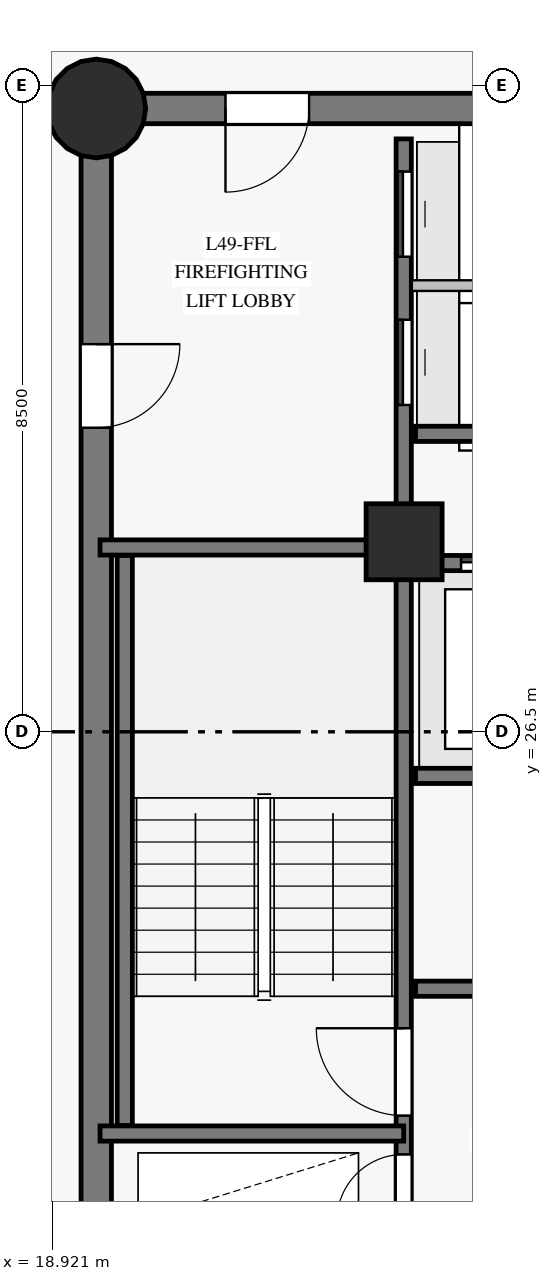
"""IFC4 building model, lengths in metres.
Left out: names, types, materials, properties, quantities, classifications, styles, units other than length and angle.
Written with IfcOpenShell. Run it as: python <this file> out.ifc"""

import sys

from ifc_helpers import new_model, si_unit, direction, frame, frame_2d, origin, origin_with_axes, origin_2d, place, context, subcontext, project, spatial, rectangle, circle, extrude, source, transform, mapped, element, fill, save


model = new_model("IFC4")
c1 = context("Model", 3, precision=1e-05, world=origin(), true_north=direction((0.0, 1.0)))
c2 = subcontext(c1, "Body", "Model", "MODEL_VIEW")
j1 = project(units=[si_unit("LENGTHUNIT", "METRE"), si_unit("PLANEANGLEUNIT", "RADIAN")], contexts=[c1])
p1 = place(None, origin())
s1 = spatial("IfcSite", under=j1, at=p1, CompositionType="ELEMENT")
p2 = place(p1, origin())
s2 = spatial("IfcBuilding", under=s1, at=p2, CompositionType="ELEMENT")
p3 = place(p2, frame((0.0, 0.0, 171.8)))
s3 = spatial("IfcBuildingStorey", under=s2, at=p3, CompositionType="ELEMENT", Elevation=171.8)
p4 = place(p3, frame((26.55, 34.7, 0.0), z_axis=(0.0, 0.0, 1.0), x_axis=(-1.0, 0.0, 0.0)))
e1 = element("IfcWall", 1, at=p4, inside=s3, PredefinedType="SHEAR", context=c2, shape_type="SweptSolid", body=[
    extrude(rectangle(XDim=7.05, YDim=0.4, at=frame_2d((3.525, 0.0))), origin(), (0.0, 0.0, 1.0), 2.825),
])
p5 = place(p4, frame((4.25, 0.0, 0.0)))
e2 = element("IfcOpeningElement", 2, at=p5, cuts=e1, PredefinedType="OPENING", context=c2, shape_type="SweptSolid", body=[
    extrude(rectangle(XDim=1.1, YDim=2.15, at=frame_2d((0.55, 1.075))), frame((0.0, 0.21, 0.0), z_axis=(0.0, -1.0, 0.0), x_axis=(1.0, 0.0, 0.0)), (0.0, 0.0, 1.0), 0.42),
])
p6 = place(p3, frame((19.5, 34.7, 0.0), z_axis=(0.0, 0.0, 1.0), x_axis=(0.0, -1.0, 0.0)))
e3 = element("IfcWall", 3, at=p6, inside=s3, PredefinedType="SHEAR", context=c2, shape_type="SweptSolid", body=[
    extrude(rectangle(XDim=16.4, YDim=0.4, at=frame_2d((8.2, 0.0))), origin(), (0.0, 0.0, 1.0), 2.825),
])
p7 = place(p6, frame((3.1, 0.0, 0.0)))
e4 = element("IfcOpeningElement", 4, at=p7, cuts=e3, PredefinedType="OPENING", context=c2, shape_type="SweptSolid", body=[
    extrude(rectangle(XDim=1.1, YDim=2.15, at=frame_2d((0.55, 1.075))), frame((0.0, 0.21, 0.0), z_axis=(0.0, -1.0, 0.0), x_axis=(1.0, 0.0, 0.0)), (0.0, 0.0, 1.0), 0.42),
])
m1 = source(origin_with_axes(), c2, "Body", "SweptSolid", [
    extrude(circle(Radius=0.65, at=origin_2d()), origin(), (0.0, 0.0, 1.0), 3.05),
])
p8 = place(p3, frame((19.5, 34.7, 0.0), z_axis=(0.0, 0.0, 1.0), x_axis=(1.0, 0.0, 0.0)))
e5 = element("IfcColumn", 5, at=p8, inside=s3, PredefinedType="COLUMN", context=c2, shape_type="MappedRepresentation", body=[
    mapped(m1, transform((0.0, 0.0, 0.0), scale=1.0)),
])
m2 = source(origin_with_axes(), c2, "Body", "SweptSolid", [
    extrude(rectangle(XDim=1.0, YDim=1.0, at=origin_2d()), origin(), (0.0, 0.0, 1.0), 3.05),
])
p9 = place(p3, frame((23.55, 29.0, 0.0), z_axis=(0.0, 0.0, 1.0), x_axis=(1.0, 0.0, 0.0)))
e6 = element("IfcColumn", 6, at=p9, inside=s3, PredefinedType="COLUMN", context=c2, shape_type="MappedRepresentation", body=[
    mapped(m2, transform((0.0, 0.0, 0.0), scale=1.0)),
])
p10 = place(p3, frame((23.545, 18.7, 0.0), z_axis=(0.0, 0.0, 1.0), x_axis=(0.0, 1.0, 0.0)))
e7 = element("IfcWall", 7, at=p10, inside=s3, PredefinedType="SHEAR", context=c2, shape_type="SweptSolid", body=[
    extrude(rectangle(XDim=15.6, YDim=0.2, at=frame_2d((7.8, 0.0))), origin(), (0.0, 0.0, 1.0), 2.825),
])
p11 = place(p10, frame((2.75, 0.0, 0.0)))
e8 = element("IfcOpeningElement", 8, at=p11, cuts=e7, PredefinedType="OPENING", context=c2, shape_type="SweptSolid", body=[
    extrude(rectangle(XDim=1.15, YDim=2.15, at=frame_2d((0.575, 1.075))), frame((0.0, 0.11, 0.0), z_axis=(0.0, -1.0, 0.0), x_axis=(1.0, 0.0, 0.0)), (0.0, 0.0, 1.0), 0.22),
])
p12 = place(p10, frame((0.14, 0.0, 0.0)))
e9 = element("IfcOpeningElement", 9, at=p12, cuts=e7, PredefinedType="OPENING", context=c2, shape_type="SweptSolid", body=[
    extrude(rectangle(XDim=0.88, YDim=2.1, at=frame_2d((0.44, 1.05))), frame((0.0, 0.11, 0.0), z_axis=(0.0, -1.0, 0.0), x_axis=(1.0, 0.0, 0.0)), (0.0, 0.0, 1.0), 0.22),
])
p13 = place(p10, frame((1.36, 0.0, 0.0)))
e10 = element("IfcOpeningElement", 10, at=p13, cuts=e7, PredefinedType="OPENING", context=c2, shape_type="SweptSolid", body=[
    extrude(rectangle(XDim=0.88, YDim=2.1, at=frame_2d((0.44, 1.05))), frame((0.0, 0.11, 0.0), z_axis=(0.0, -1.0, 0.0), x_axis=(1.0, 0.0, 0.0)), (0.0, 0.0, 1.0), 0.22),
])
p14 = place(p10, frame((12.1, 0.0, 0.0)))
e11 = element("IfcOpeningElement", 11, at=p14, cuts=e7, PredefinedType="OPENING", context=c2, shape_type="SweptSolid", body=[
    extrude(rectangle(XDim=1.12, YDim=2.15, at=frame_2d((0.56, 1.075))), frame((0.0, 0.11, 0.0), z_axis=(0.0, -1.0, 0.0), x_axis=(1.0, 0.0, 0.0)), (0.0, 0.0, 1.0), 0.22),
])
p15 = place(p10, frame((14.05, 0.0, 0.0)))
e12 = element("IfcOpeningElement", 12, at=p15, cuts=e7, PredefinedType="OPENING", context=c2, shape_type="SweptSolid", body=[
    extrude(rectangle(XDim=1.12, YDim=2.15, at=frame_2d((0.56, 1.075))), frame((0.0, 0.11, 0.0), z_axis=(0.0, -1.0, 0.0), x_axis=(1.0, 0.0, 0.0)), (0.0, 0.0, 1.0), 0.22),
])
p16 = place(p3, frame((23.7, 23.12, 0.0), z_axis=(0.0, 0.0, 1.0), x_axis=(1.0, 0.0, 0.0)))
e13 = element("IfcWall", 13, at=p16, inside=s3, PredefinedType="SHEAR", context=c2, shape_type="SweptSolid", body=[
    extrude(rectangle(XDim=9.6, YDim=0.2, at=frame_2d((4.8, 0.0))), origin(), (0.0, 0.0, 1.0), 2.825),
])
p17 = place(p16, frame((1.1, 0.0, 0.0)))
e14 = element("IfcOpeningElement", 14, at=p17, cuts=e13, PredefinedType="OPENING", context=c2, shape_type="SweptSolid", body=[
    extrude(rectangle(XDim=0.92, YDim=2.1, at=frame_2d((0.46, 1.05))), frame((0.0, 0.11, 0.0), z_axis=(0.0, -1.0, 0.0), x_axis=(1.0, 0.0, 0.0)), (0.0, 0.0, 1.0), 0.22),
])
p18 = place(p16, frame((5.2, 0.0, 0.0)))
e15 = element("IfcOpeningElement", 15, at=p18, cuts=e13, PredefinedType="OPENING", context=c2, shape_type="SweptSolid", body=[
    extrude(rectangle(XDim=1.0, YDim=2.15, at=frame_2d((0.5, 1.075))), frame((0.0, 0.11, 0.0), z_axis=(0.0, -1.0, 0.0), x_axis=(1.0, 0.0, 0.0)), (0.0, 0.0, 1.0), 0.22),
])
p19 = place(p3, frame((23.7, 25.92, 0.0), z_axis=(0.0, 0.0, 1.0), x_axis=(1.0, 0.0, 0.0)))
e16 = element("IfcWall", 16, at=p19, inside=s3, PredefinedType="SHEAR", context=c2, shape_type="SweptSolid", body=[
    extrude(rectangle(XDim=9.6, YDim=0.2, at=frame_2d((4.8, 0.0))), origin(), (0.0, 0.0, 1.0), 2.825),
])
p20 = place(p3, frame((23.7, 28.72, 0.0), z_axis=(0.0, 0.0, 1.0), x_axis=(1.0, 0.0, 0.0)))
e17 = element("IfcWall", 17, at=p20, inside=s3, PredefinedType="SHEAR", context=c2, shape_type="SweptSolid", body=[
    extrude(rectangle(XDim=9.6, YDim=0.2, at=frame_2d((4.8, 0.0))), origin(), (0.0, 0.0, 1.0), 2.825),
])
p21 = place(p20, frame((0.6, 0.0, 0.0)))
e18 = element("IfcOpeningElement", 18, at=p21, cuts=e17, PredefinedType="OPENING", context=c2, shape_type="SweptSolid", body=[
    extrude(rectangle(XDim=1.1, YDim=2.15, at=frame_2d((0.55, 1.075))), frame((0.0, 0.11, 0.0), z_axis=(0.0, -1.0, 0.0), x_axis=(1.0, 0.0, 0.0)), (0.0, 0.0, 1.0), 0.22),
])
p22 = place(p20, frame((2.98, 0.0, 0.0)))
e19 = element("IfcOpeningElement", 19, at=p22, cuts=e17, PredefinedType="OPENING", context=c2, shape_type="SweptSolid", body=[
    extrude(rectangle(XDim=1.1, YDim=2.15, at=frame_2d((0.55, 1.075))), frame((0.0, 0.11, 0.0), z_axis=(0.0, -1.0, 0.0), x_axis=(1.0, 0.0, 0.0)), (0.0, 0.0, 1.0), 0.22),
])
p23 = place(p20, frame((5.36, 0.0, 0.0)))
e20 = element("IfcOpeningElement", 20, at=p23, cuts=e17, PredefinedType="OPENING", context=c2, shape_type="SweptSolid", body=[
    extrude(rectangle(XDim=1.1, YDim=2.15, at=frame_2d((0.55, 1.075))), frame((0.0, 0.11, 0.0), z_axis=(0.0, -1.0, 0.0), x_axis=(1.0, 0.0, 0.0)), (0.0, 0.0, 1.0), 0.22),
])
p24 = place(p20, frame((7.74, 0.0, 0.0)))
e21 = element("IfcOpeningElement", 21, at=p24, cuts=e17, PredefinedType="OPENING", context=c2, shape_type="SweptSolid", body=[
    extrude(rectangle(XDim=1.1, YDim=2.15, at=frame_2d((0.55, 1.075))), frame((0.0, 0.11, 0.0), z_axis=(0.0, -1.0, 0.0), x_axis=(1.0, 0.0, 0.0)), (0.0, 0.0, 1.0), 0.22),
])
p25 = place(p3, frame((19.875, 21.32, 0.0), z_axis=(0.0, 0.0, 1.0), x_axis=(0.0, 1.0, 0.0)))
e22 = element("IfcWall", 22, at=p25, inside=s3, PredefinedType="SHEAR", context=c2, shape_type="SweptSolid", body=[
    extrude(rectangle(XDim=7.5, YDim=0.2, at=frame_2d((3.75, 0.0))), origin(), (0.0, 0.0, 1.0), 2.825),
])
for number, where, z_axis, x_axis in (
    (23, (19.55, 21.215, 0.0), (0.0, 0.0, 1.0), (1.0, 0.0, 0.0)),
    (24, (19.55, 28.925, 0.0), (0.0, 0.0, 1.0), (1.0, 0.0, 0.0)),
):
    element("IfcWall", number, at=place(p3, frame(where, z_axis=z_axis, x_axis=x_axis)), inside=s3, PredefinedType="SHEAR", context=c2, shape_type="SweptSolid", body=[
        extrude(rectangle(XDim=3.995, YDim=0.2, at=frame_2d((1.998, 0.0))), origin(), (0.0, 0.0, 1.0), 2.825),
    ])
p26 = place(p3, frame((23.7, 30.42, 0.0), z_axis=(0.0, 0.0, 1.0), x_axis=(1.0, 0.0, 0.0)))
e25 = element("IfcWall", 25, at=p26, inside=s3, PredefinedType="SHEAR", context=c2, shape_type="SweptSolid", body=[
    extrude(rectangle(XDim=2.78, YDim=0.2, at=frame_2d((1.39, 0.0))), origin(), (0.0, 0.0, 1.0), 2.825),
])
p27 = place(p3, frame((23.652, 32.37, 0.0), z_axis=(0.0, 0.0, 1.0), x_axis=(1.0, 0.0, 0.0)))
e26 = element("IfcWall", 26, at=p27, inside=s3, PredefinedType="PARTITIONING", context=c2, shape_type="SweptSolid", body=[
    extrude(rectangle(XDim=2.828, YDim=0.14, at=frame_2d((1.414, 0.0))), origin(), (0.0, 0.0, 1.0), 2.825),
])
m3 = source(origin_with_axes(), c2, "Body", "SweptSolid", [
    extrude(rectangle(XDim=1.15, YDim=2.15, at=frame_2d((0.575, 1.075))), frame((0.0, 0.025, 0.0), z_axis=(0.0, -1.0, 0.0), x_axis=(1.0, 0.0, 0.0)), (0.0, 0.0, 1.0), 0.05),
])
p28 = place(p11, origin())
e27 = element("IfcDoor", 27, at=p28, inside=s3, OperationType="SINGLE_SWING_RIGHT", PredefinedType="DOOR", context=c2, shape_type="MappedRepresentation", body=[
    mapped(m3, transform((0.0, 0.0, 0.0), scale=1.0)),
])
fill(e8, e27)
m4 = source(origin_with_axes(), c2, "Body", "SweptSolid", [
    extrude(rectangle(XDim=1.1, YDim=2.15, at=frame_2d((0.55, 1.075))), frame((0.0, 0.025, 0.0), z_axis=(0.0, -1.0, 0.0), x_axis=(1.0, 0.0, 0.0)), (0.0, 0.0, 1.0), 0.05),
])
p29 = place(p5, origin())
e28 = element("IfcDoor", 28, at=p29, inside=s3, OperationType="SINGLE_SWING_RIGHT", PredefinedType="DOOR", context=c2, shape_type="MappedRepresentation", body=[
    mapped(m4, transform((0.0, 0.0, 0.0), scale=1.0)),
])
fill(e2, e28)
p30 = place(p7, origin())
e29 = element("IfcDoor", 29, at=p30, inside=s3, OperationType="SINGLE_SWING_LEFT", PredefinedType="DOOR", context=c2, shape_type="MappedRepresentation", body=[
    mapped(m4, transform((0.0, 0.0, 0.0), scale=1.0)),
])
fill(e4, e29)
m5 = source(origin_with_axes(), c2, "Body", "SweptSolid", [
    extrude(rectangle(XDim=0.88, YDim=2.1, at=frame_2d((0.44, 1.05))), frame((0.0, 0.025, 0.0), z_axis=(0.0, -1.0, 0.0), x_axis=(1.0, 0.0, 0.0)), (0.0, 0.0, 1.0), 0.05),
])
p31 = place(p13, origin())
e30 = element("IfcDoor", 30, at=p31, inside=s3, OperationType="SINGLE_SWING_LEFT", PredefinedType="DOOR", context=c2, shape_type="MappedRepresentation", body=[
    mapped(m5, transform((0.0, 0.0, 0.0), scale=1.0)),
])
fill(e10, e30)
p32 = place(p21, origin())
e31 = element("IfcDoor", 31, at=p32, inside=s3, OperationType="SLIDING_TO_LEFT", PredefinedType="DOOR", context=c2, shape_type="MappedRepresentation", body=[
    mapped(m4, transform((0.0, 0.0, 0.0), scale=1.0)),
])
fill(e18, e31)
m6 = source(origin_with_axes(), c2, "Body", "SweptSolid", [
    extrude(rectangle(XDim=1.12, YDim=2.15, at=frame_2d((0.56, 1.075))), frame((0.0, 0.025, 0.0), z_axis=(0.0, -1.0, 0.0), x_axis=(1.0, 0.0, 0.0)), (0.0, 0.0, 1.0), 0.05),
])
p33 = place(p14, origin())
e32 = element("IfcDoor", 32, at=p33, inside=s3, OperationType="SLIDING_TO_LEFT", PredefinedType="DOOR", context=c2, shape_type="MappedRepresentation", body=[
    mapped(m6, transform((0.0, 0.0, 0.0), scale=1.0)),
])
fill(e11, e32)
p34 = place(p15, origin())
e33 = element("IfcDoor", 33, at=p34, inside=s3, OperationType="SLIDING_TO_RIGHT", PredefinedType="DOOR", context=c2, shape_type="MappedRepresentation", body=[
    mapped(m6, transform((0.0, 0.0, 0.0), scale=1.0)),
])
fill(e12, e33)
save(model, sys.argv[1])
